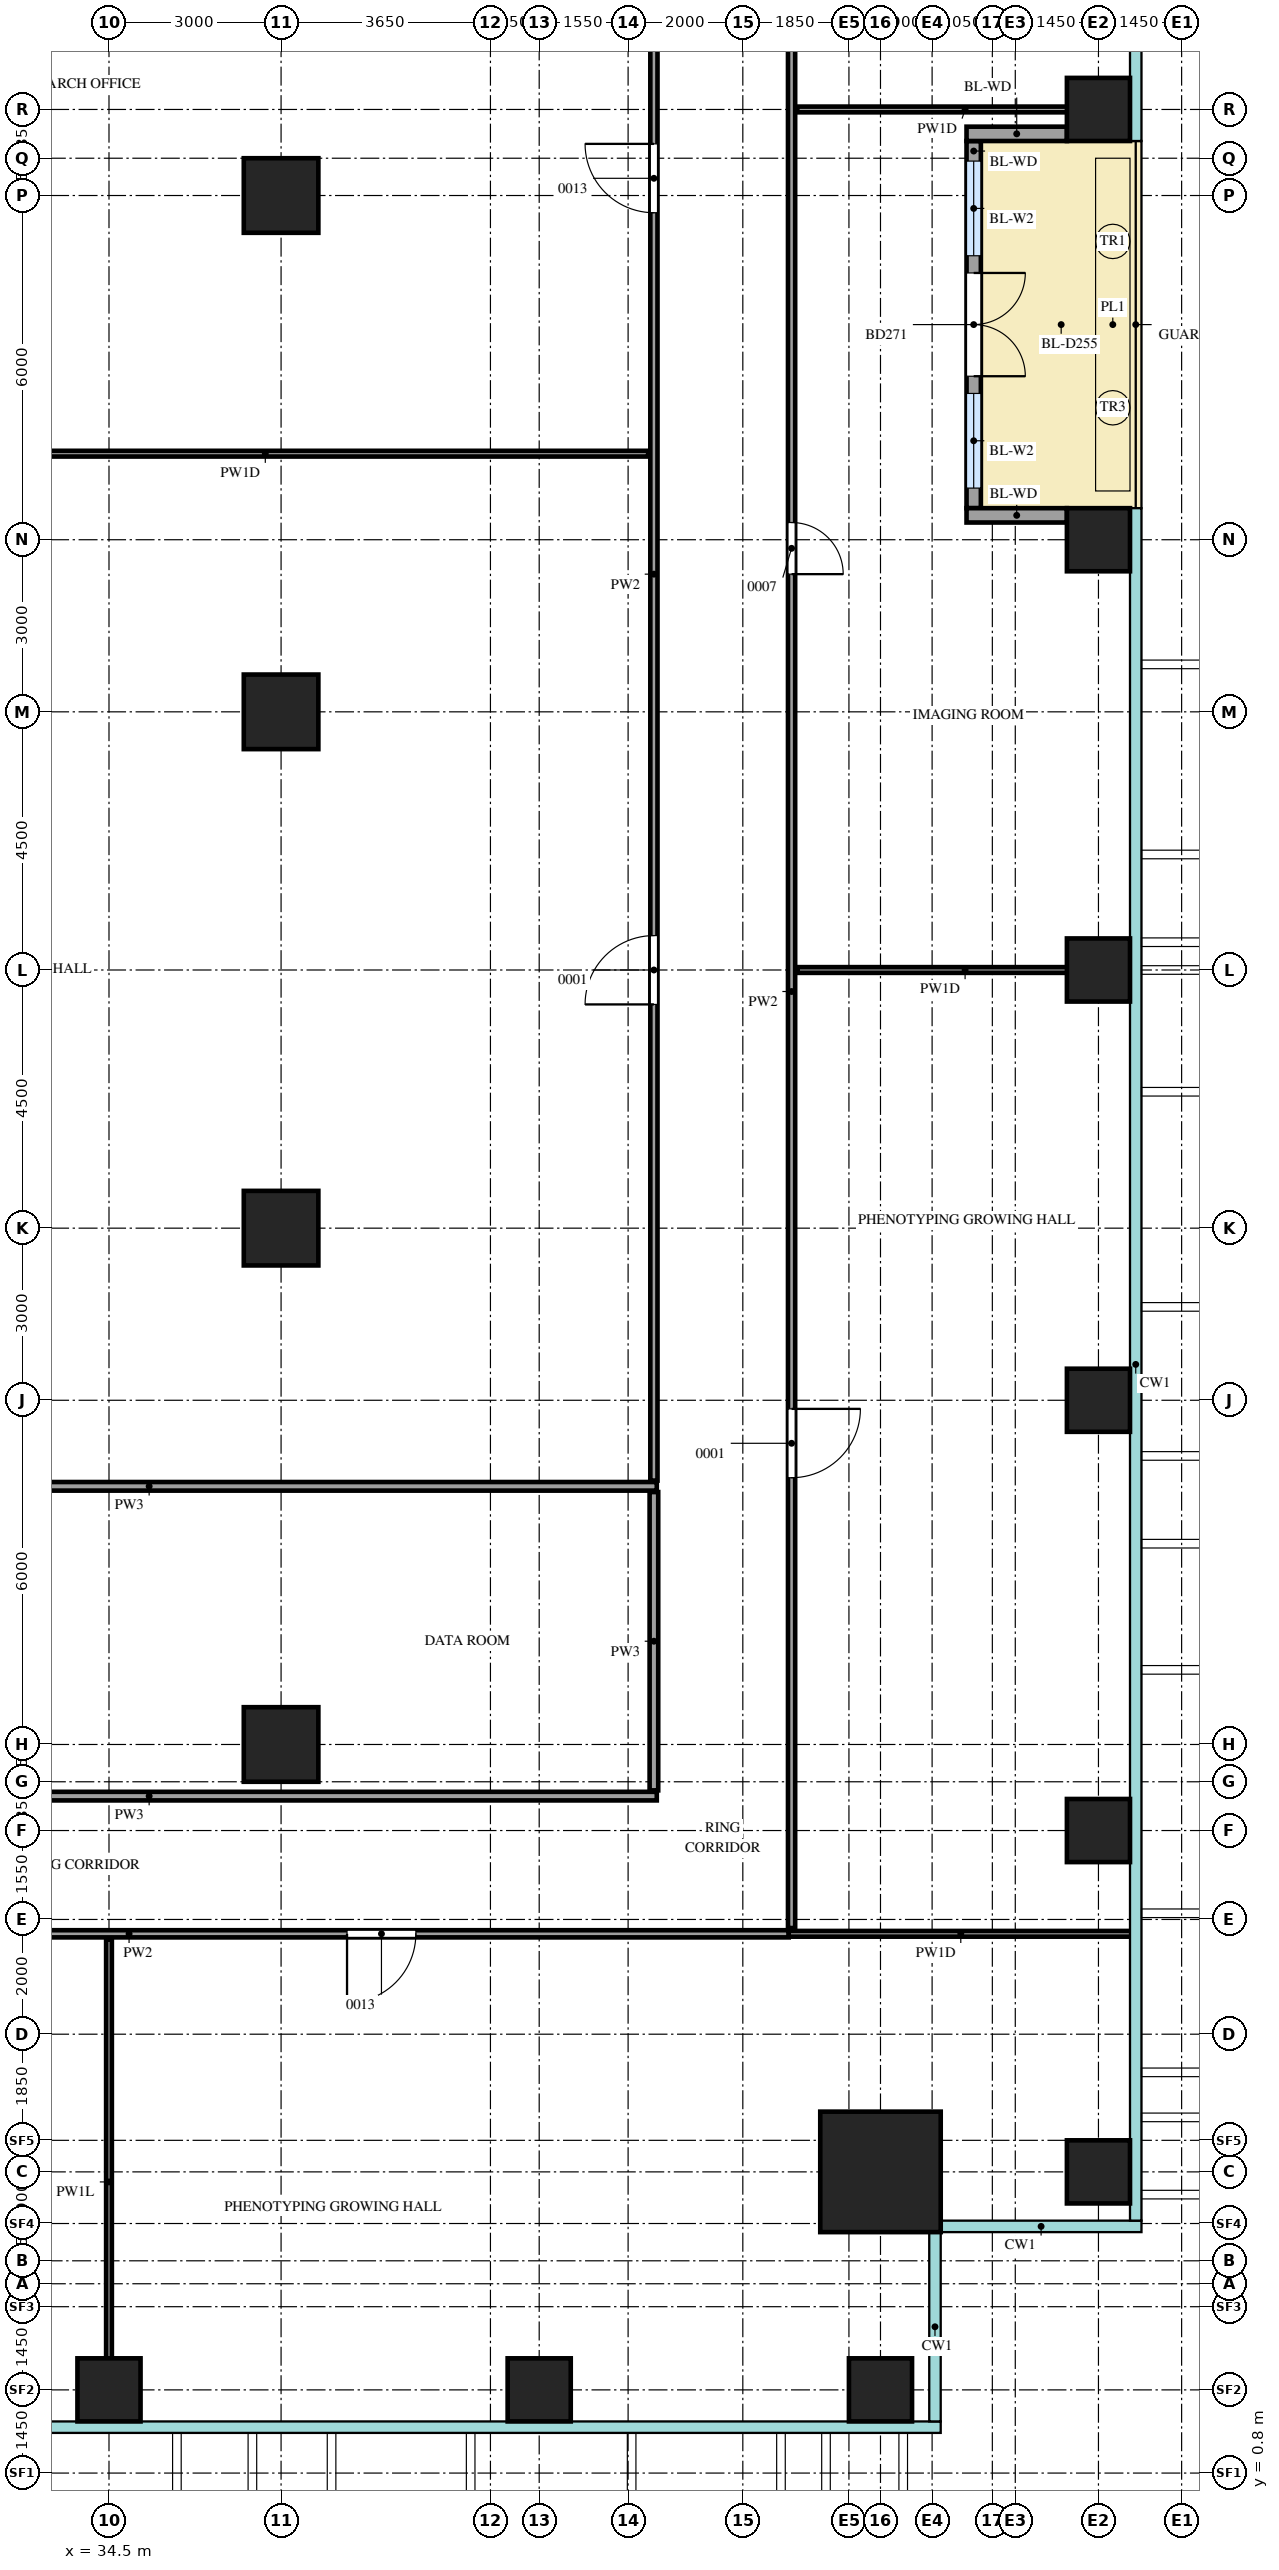
"""IFC4 building model, lengths in metres.
Left out: names, types, materials, properties, quantities, classifications, styles, units other than length and angle.
Written with IfcOpenShell. Run it as: python <this file> out.ifc"""

import sys

from ifc_helpers import new_model, si_unit, direction, frame, frame_2d, origin, origin_2d, place, context, subcontext, project, spatial, rectangle, extrude, source, transform, mapped, element, fill, save


model = new_model("IFC4")
c1 = context("Model", 3, precision=1e-05, world=origin(), true_north=direction((0.0, 1.0)))
c2 = subcontext(c1, "Body", "Model", "MODEL_VIEW")
j1 = project(units=[si_unit("LENGTHUNIT", "METRE"), si_unit("PLANEANGLEUNIT", "RADIAN")], contexts=[c1])
p1 = place(None, origin())
s1 = spatial("IfcSite", under=j1, at=p1, CompositionType="ELEMENT")
p2 = place(p1, origin())
s2 = spatial("IfcBuilding", under=s1, at=p2, CompositionType="ELEMENT")
p3 = place(p2, frame((0.0, 0.0, 127.9)))
s3 = spatial("IfcBuildingStorey", under=s2, at=p3, CompositionType="ELEMENT", Elevation=127.9)
m1 = source(origin(), c2, "Body", "SweptSolid", [
    extrude(rectangle(XDim=2.1, YDim=2.1, at=origin_2d()), origin(), (0.0, 0.0, 1.0), 4.4),
])
p4 = place(p3, frame((47.95, 6.05, 0.0), z_axis=(0.0, 0.0, 1.0), x_axis=(1.0, 0.0, 0.0)))
e1 = element("IfcColumn", 1, at=p4, inside=s3, PredefinedType="COLUMN", context=c2, shape_type="MappedRepresentation", body=[
    mapped(m1, transform((0.0, 0.0, 0.0))),
])
m2 = source(origin(), c2, "Body", "SweptSolid", [
    extrude(rectangle(XDim=1.1, YDim=1.1, at=origin_2d()), origin(), (0.0, 0.0, 1.0), 4.1),
])
for number, where, z_axis, x_axis in (
    (2, (34.5, 2.25, 0.0), (0.0, 0.0, 1.0), (1.0, 0.0, 0.0)),
    (3, (42.0, 2.25, 0.0), (0.0, 0.0, 1.0), (1.0, 0.0, 0.0)),
    (4, (47.95, 2.25, 0.0), (0.0, 0.0, 1.0), (1.0, 0.0, 0.0)),
    (5, (51.75, 6.05, 0.0), (0.0, 0.0, 1.0), (1.0, 0.0, 0.0)),
    (6, (51.75, 12.0, 0.0), (0.0, 0.0, 1.0), (1.0, 0.0, 0.0)),
    (7, (51.75, 19.5, 0.0), (0.0, 0.0, 1.0), (1.0, 0.0, 0.0)),
    (8, (51.75, 27.0, 0.0), (0.0, 0.0, 1.0), (1.0, 0.0, 0.0)),
    (9, (51.75, 34.5, 0.0), (0.0, 0.0, 1.0), (1.0, 0.0, 0.0)),
    (10, (51.75, 42.0, 0.0), (0.0, 0.0, 1.0), (1.0, 0.0, 0.0)),
):
    element("IfcColumn", number, at=place(p3, frame(where, z_axis=z_axis, x_axis=x_axis)), inside=s3, PredefinedType="COLUMN", context=c2, shape_type="MappedRepresentation", body=[
        mapped(m2, transform((0.0, 0.0, 0.0))),
    ])
m3 = source(origin(), c2, "Body", "SweptSolid", [
    extrude(rectangle(XDim=1.3, YDim=1.3, at=origin_2d()), origin(), (0.0, 0.0, 1.0), 4.1),
])
for number, where, z_axis, x_axis in (
    (11, (37.5, 13.5, 0.0), (0.0, 0.0, 1.0), (1.0, 0.0, 0.0)),
    (12, (37.5, 22.5, 0.0), (0.0, 0.0, 1.0), (1.0, 0.0, 0.0)),
    (13, (37.5, 31.5, 0.0), (0.0, 0.0, 1.0), (1.0, 0.0, 0.0)),
    (14, (37.5, 40.5, 0.0), (0.0, 0.0, 1.0), (1.0, 0.0, 0.0)),
):
    element("IfcColumn", number, at=place(p3, frame(where, z_axis=z_axis, x_axis=x_axis)), inside=s3, PredefinedType="COLUMN", context=c2, shape_type="MappedRepresentation", body=[
        mapped(m3, transform((0.0, 0.0, 0.0))),
    ])
m4 = source(origin(), c2, "Body", "SweptSolid", [
    extrude(rectangle(XDim=6.4, YDim=0.25, at=frame_2d((3.2, 0.0))), origin(), (0.0, 0.0, 1.0), 3.55),
])
p5 = place(p3, frame((49.575, 35.05, 0.0), z_axis=(0.0, 0.0, 1.0), x_axis=(0.0, 1.0, 0.0)))
e15 = element("IfcWall", 15, at=p5, inside=s3, PredefinedType="SOLIDWALL", context=c2, shape_type="MappedRepresentation", body=[
    mapped(m4, transform((0.0, 0.0, 0.0))),
])
m5 = source(origin(), c2, "Body", "SweptSolid", [
    extrude(rectangle(XDim=1.65, YDim=2.4, at=frame_2d((0.825, 1.2))), frame((0.0, 0.135, 0.0), z_axis=(0.0, -1.0, 0.0), x_axis=(1.0, 0.0, 0.0)), (0.0, 0.0, 1.0), 0.27),
])
p6 = place(p5, frame((0.35, 0.0, 0.0)))
e16 = element("IfcOpeningElement", 16, at=p6, cuts=e15, PredefinedType="OPENING", context=c2, shape_type="MappedRepresentation", body=[
    mapped(m5, transform((0.0, 0.0, 0.0))),
])
p7 = place(p5, frame((4.4, 0.0, 0.0)))
e17 = element("IfcOpeningElement", 17, at=p7, cuts=e15, PredefinedType="OPENING", context=c2, shape_type="MappedRepresentation", body=[
    mapped(m5, transform((0.0, 0.0, 0.0))),
])
m6 = source(origin(), c2, "Body", "SweptSolid", [
    extrude(rectangle(XDim=1.8, YDim=2.4, at=frame_2d((0.9, 1.2))), frame((0.0, 0.135, 0.0), z_axis=(0.0, -1.0, 0.0), x_axis=(1.0, 0.0, 0.0)), (0.0, 0.0, 1.0), 0.27),
])
p8 = place(p5, frame((2.3, 0.0, 0.0)))
e18 = element("IfcOpeningElement", 18, at=p8, cuts=e15, PredefinedType="OPENING", context=c2, shape_type="MappedRepresentation", body=[
    mapped(m6, transform((0.0, 0.0, 0.0))),
])
m7 = source(origin(), c2, "Body", "SweptSolid", [
    extrude(rectangle(XDim=1.75, YDim=0.25, at=frame_2d((0.875, 0.0))), origin(), (0.0, 0.0, 1.0), 3.55),
])
for number, where, z_axis, x_axis in (
    (19, (51.2, 34.925, 0.0), (0.0, 0.0, 1.0), (-1.0, 0.0, 0.0)),
    (20, (51.2, 41.575, 0.0), (0.0, 0.0, 1.0), (-1.0, 0.0, 0.0)),
):
    element("IfcWall", number, at=place(p3, frame(where, z_axis=z_axis, x_axis=x_axis)), inside=s3, PredefinedType="SOLIDWALL", context=c2, shape_type="MappedRepresentation", body=[
        mapped(m7, transform((0.0, 0.0, 0.0))),
    ])
m8 = source(origin(), c2, "Body", "SweptSolid", [
    extrude(rectangle(XDim=8.45, YDim=0.1, at=frame_2d((4.225, 0.0))), origin(), (0.0, 0.0, 1.0), 3.6),
])
p9 = place(p3, frame((34.5, 1.65, 0.0), z_axis=(0.0, 0.0, 1.0), x_axis=(0.0, 1.0, 0.0)))
e21 = element("IfcWall", 21, at=p9, inside=s3, PredefinedType="PARTITIONING", context=c2, shape_type="MappedRepresentation", body=[
    mapped(m8, transform((0.0, 0.0, 0.0))),
])
m9 = source(origin(), c2, "Body", "SweptSolid", [
    extrude(rectangle(XDim=20.0, YDim=0.125, at=frame_2d((10.0, 0.0))), origin(), (0.0, 0.0, 1.0), 4.2),
])
p10 = place(p3, frame((26.35, 10.2, 0.0), z_axis=(0.0, 0.0, 1.0), x_axis=(1.0, 0.0, 0.0)))
e22 = element("IfcWall", 22, at=p10, inside=s3, PredefinedType="PARTITIONING", context=c2, shape_type="MappedRepresentation", body=[
    mapped(m9, transform((0.0, 0.0, 0.0))),
])
m10 = source(origin(), c2, "Body", "SweptSolid", [
    extrude(rectangle(XDim=1.2, YDim=2.1, at=frame_2d((0.6, 1.05))), frame((0.0, 0.073, 0.0), z_axis=(0.0, -1.0, 0.0), x_axis=(1.0, 0.0, 0.0)), (0.0, 0.0, 1.0), 0.145),
])
p11 = place(p10, frame((3.5, 0.0, 0.0)))
e23 = element("IfcOpeningElement", 23, at=p11, cuts=e22, PredefinedType="OPENING", context=c2, shape_type="MappedRepresentation", body=[
    mapped(m10, transform((0.0, 0.0, 0.0))),
])
p12 = place(p10, frame((12.3, 0.0, 0.0)))
e24 = element("IfcOpeningElement", 24, at=p12, cuts=e22, PredefinedType="OPENING", context=c2, shape_type="MappedRepresentation", body=[
    mapped(m10, transform((0.0, 0.0, 0.0))),
])
m11 = source(origin(), c2, "Body", "SweptSolid", [
    extrude(rectangle(XDim=6.0, YDim=0.1, at=frame_2d((3.0, 0.0))), origin(), (0.0, 0.0, 1.0), 4.2),
])
p13 = place(p3, frame((46.35, 10.2, 0.0), z_axis=(0.0, 0.0, 1.0), x_axis=(1.0, 0.0, 0.0)))
e25 = element("IfcWall", 25, at=p13, inside=s3, PredefinedType="PARTITIONING", context=c2, shape_type="MappedRepresentation", body=[
    mapped(m11, transform((0.0, 0.0, 0.0))),
])
m12 = source(origin(), c2, "Body", "SweptSolid", [
    extrude(rectangle(XDim=37.65, YDim=0.125, at=frame_2d((18.825, 0.0))), origin(), (0.0, 0.0, 1.0), 4.2),
])
p14 = place(p3, frame((46.4, 10.3, 0.0), z_axis=(0.0, 0.0, 1.0), x_axis=(0.0, 1.0, 0.0)))
e26 = element("IfcWall", 26, at=p14, inside=s3, PredefinedType="PARTITIONING", context=c2, shape_type="MappedRepresentation", body=[
    mapped(m12, transform((0.0, 0.0, 0.0))),
])
p15 = place(p14, frame((7.85, 0.0, 0.0)))
e27 = element("IfcOpeningElement", 27, at=p15, cuts=e26, PredefinedType="OPENING", context=c2, shape_type="MappedRepresentation", body=[
    mapped(m10, transform((0.0, 0.0, 0.0))),
])
m13 = source(origin(), c2, "Body", "SweptSolid", [
    extrude(rectangle(XDim=0.9, YDim=2.1, at=frame_2d((0.45, 1.05))), frame((0.0, 0.073, 0.0), z_axis=(0.0, -1.0, 0.0), x_axis=(1.0, 0.0, 0.0)), (0.0, 0.0, 1.0), 0.145),
])
p16 = place(p14, frame((23.6, 0.0, 0.0)))
e28 = element("IfcOpeningElement", 28, at=p16, cuts=e26, PredefinedType="OPENING", context=c2, shape_type="MappedRepresentation", body=[
    mapped(m13, transform((0.0, 0.0, 0.0))),
])
p17 = place(p14, frame((33.2, 0.0, 0.0)))
e29 = element("IfcOpeningElement", 29, at=p17, cuts=e26, PredefinedType="OPENING", context=c2, shape_type="MappedRepresentation", body=[
    mapped(m13, transform((0.0, 0.0, 0.0))),
])
m14 = source(origin(), c2, "Body", "SweptSolid", [
    extrude(rectangle(XDim=17.7, YDim=0.15, at=frame_2d((8.85, 0.0))), origin(), (0.0, 0.0, 1.0), 4.2),
])
p18 = place(p3, frame((26.35, 12.6, 0.0), z_axis=(0.0, 0.0, 1.0), x_axis=(1.0, 0.0, 0.0)))
e30 = element("IfcWall", 30, at=p18, inside=s3, PredefinedType="PARTITIONING", context=c2, shape_type="MappedRepresentation", body=[
    mapped(m14, transform((0.0, 0.0, 0.0))),
])
m15 = source(origin(), c2, "Body", "SweptSolid", [
    extrude(rectangle(XDim=5.2, YDim=0.15, at=frame_2d((2.6, 0.0))), origin(), (0.0, 0.0, 1.0), 4.2),
])
p19 = place(p3, frame((44.0, 12.7, 0.0), z_axis=(0.0, 0.0, 1.0), x_axis=(0.0, 1.0, 0.0)))
e31 = element("IfcWall", 31, at=p19, inside=s3, PredefinedType="PARTITIONING", context=c2, shape_type="MappedRepresentation", body=[
    mapped(m15, transform((0.0, 0.0, 0.0))),
])
p20 = place(p3, frame((26.35, 18.0, 0.0), z_axis=(0.0, 0.0, 1.0), x_axis=(1.0, 0.0, 0.0)))
e32 = element("IfcWall", 32, at=p20, inside=s3, PredefinedType="PARTITIONING", context=c2, shape_type="MappedRepresentation", body=[
    mapped(m14, transform((0.0, 0.0, 0.0))),
])
m16 = source(origin(), c2, "Body", "SweptSolid", [
    extrude(rectangle(XDim=27.45, YDim=0.125, at=frame_2d((13.725, 0.0))), origin(), (0.0, 0.0, 1.0), 4.2),
])
p21 = place(p3, frame((44.0, 18.1, 0.0), z_axis=(0.0, 0.0, 1.0), x_axis=(0.0, 1.0, 0.0)))
e33 = element("IfcWall", 33, at=p21, inside=s3, PredefinedType="PARTITIONING", context=c2, shape_type="MappedRepresentation", body=[
    mapped(m16, transform((0.0, 0.0, 0.0))),
])
p22 = place(p21, frame((8.3, 0.0, 0.0)))
e34 = element("IfcOpeningElement", 34, at=p22, cuts=e33, PredefinedType="OPENING", context=c2, shape_type="MappedRepresentation", body=[
    mapped(m10, transform((0.0, 0.0, 0.0))),
])
p23 = place(p21, frame((22.1, 0.0, 0.0)))
e35 = element("IfcOpeningElement", 35, at=p23, cuts=e33, PredefinedType="OPENING", context=c2, shape_type="MappedRepresentation", body=[
    mapped(m10, transform((0.0, 0.0, 0.0))),
])
m17 = source(origin(), c2, "Body", "SweptSolid", [
    extrude(rectangle(XDim=5.85, YDim=0.1, at=frame_2d((2.925, 0.0))), origin(), (0.0, 0.0, 1.0), 4.2),
])
p24 = place(p3, frame((46.5, 27.0, 0.0), z_axis=(0.0, 0.0, 1.0), x_axis=(1.0, 0.0, 0.0)))
e36 = element("IfcWall", 36, at=p24, inside=s3, PredefinedType="PARTITIONING", context=c2, shape_type="MappedRepresentation", body=[
    mapped(m17, transform((0.0, 0.0, 0.0))),
])
m18 = source(origin(), c2, "Body", "SweptSolid", [
    extrude(rectangle(XDim=13.35, YDim=0.1, at=frame_2d((6.675, 0.0))), origin(), (0.0, 0.0, 1.0), 4.2),
])
p25 = place(p3, frame((30.55, 36.0, 0.0), z_axis=(0.0, 0.0, 1.0), x_axis=(1.0, 0.0, 0.0)))
e37 = element("IfcWall", 37, at=p25, inside=s3, PredefinedType="PARTITIONING", context=c2, shape_type="MappedRepresentation", body=[
    mapped(m18, transform((0.0, 0.0, 0.0))),
])
p26 = place(p3, frame((46.5, 42.0, 0.0), z_axis=(0.0, 0.0, 1.0), x_axis=(1.0, 0.0, 0.0)))
e38 = element("IfcWall", 38, at=p26, inside=s3, PredefinedType="PARTITIONING", context=c2, shape_type="MappedRepresentation", body=[
    mapped(m17, transform((0.0, 0.0, 0.0))),
])
m19 = source(origin(), c2, "Body", "SweptSolid", [
    extrude(rectangle(XDim=1.65, YDim=2.4, at=frame_2d((0.825, 1.2))), frame((0.0, 0.03, 0.0), z_axis=(0.0, -1.0, 0.0), x_axis=(1.0, 0.0, 0.0)), (0.0, 0.0, 1.0), 0.06),
])
p27 = place(p6, origin())
e39 = element("IfcWindow", 39, at=p27, inside=s3, PartitioningType="SINGLE_PANEL", PredefinedType="WINDOW", context=c2, shape_type="MappedRepresentation", body=[
    mapped(m19, transform((0.0, 0.0, 0.0))),
])
fill(e16, e39)
p28 = place(p7, origin())
e40 = element("IfcWindow", 40, at=p28, inside=s3, PartitioningType="SINGLE_PANEL", PredefinedType="WINDOW", context=c2, shape_type="MappedRepresentation", body=[
    mapped(m19, transform((0.0, 0.0, 0.0))),
])
fill(e17, e40)
m20 = source(origin(), c2, "Body", "SweptSolid", [
    extrude(rectangle(XDim=1.8, YDim=2.4, at=frame_2d((0.9, 1.2))), frame((0.0, 0.025, 0.0), z_axis=(0.0, -1.0, 0.0), x_axis=(1.0, 0.0, 0.0)), (0.0, 0.0, 1.0), 0.05),
])
p29 = place(p8, origin())
e41 = element("IfcDoor", 41, at=p29, inside=s3, OperationType="DOUBLE_DOOR_DOUBLE_SWING", PredefinedType="DOOR", context=c2, shape_type="MappedRepresentation", body=[
    mapped(m20, transform((0.0, 0.0, 0.0))),
])
fill(e18, e41)
m21 = source(origin(), c2, "Body", "SweptSolid", [
    extrude(rectangle(XDim=1.2, YDim=2.1, at=frame_2d((0.6, 1.05))), frame((0.0, 0.025, 0.0), z_axis=(0.0, -1.0, 0.0), x_axis=(1.0, 0.0, 0.0)), (0.0, 0.0, 1.0), 0.05),
])
p30 = place(p12, origin())
e42 = element("IfcDoor", 42, at=p30, inside=s3, OperationType="SINGLE_SWING_LEFT", PredefinedType="DOOR", context=c2, shape_type="MappedRepresentation", body=[
    mapped(m21, transform((0.0, 0.0, 0.0))),
])
fill(e24, e42)
p31 = place(p22, origin())
e43 = element("IfcDoor", 43, at=p31, inside=s3, OperationType="SINGLE_SWING_RIGHT", PredefinedType="DOOR", context=c2, shape_type="MappedRepresentation", body=[
    mapped(m21, transform((0.0, 0.0, 0.0))),
])
fill(e34, e43)
p32 = place(p23, origin())
e44 = element("IfcDoor", 44, at=p32, inside=s3, OperationType="SINGLE_SWING_LEFT", PredefinedType="DOOR", context=c2, shape_type="MappedRepresentation", body=[
    mapped(m21, transform((0.0, 0.0, 0.0))),
])
fill(e35, e44)
p33 = place(p15, origin())
e45 = element("IfcDoor", 45, at=p33, inside=s3, OperationType="SINGLE_SWING_RIGHT", PredefinedType="DOOR", context=c2, shape_type="MappedRepresentation", body=[
    mapped(m21, transform((0.0, 0.0, 0.0))),
])
fill(e27, e45)
m22 = source(origin(), c2, "Body", "SweptSolid", [
    extrude(rectangle(XDim=0.9, YDim=2.1, at=frame_2d((0.45, 1.05))), frame((0.0, 0.025, 0.0), z_axis=(0.0, -1.0, 0.0), x_axis=(1.0, 0.0, 0.0)), (0.0, 0.0, 1.0), 0.05),
])
p34 = place(p16, origin())
e46 = element("IfcDoor", 46, at=p34, inside=s3, OperationType="SINGLE_SWING_LEFT", PredefinedType="DOOR", context=c2, shape_type="MappedRepresentation", body=[
    mapped(m22, transform((0.0, 0.0, 0.0))),
])
fill(e28, e46)
save(model, sys.argv[1])
